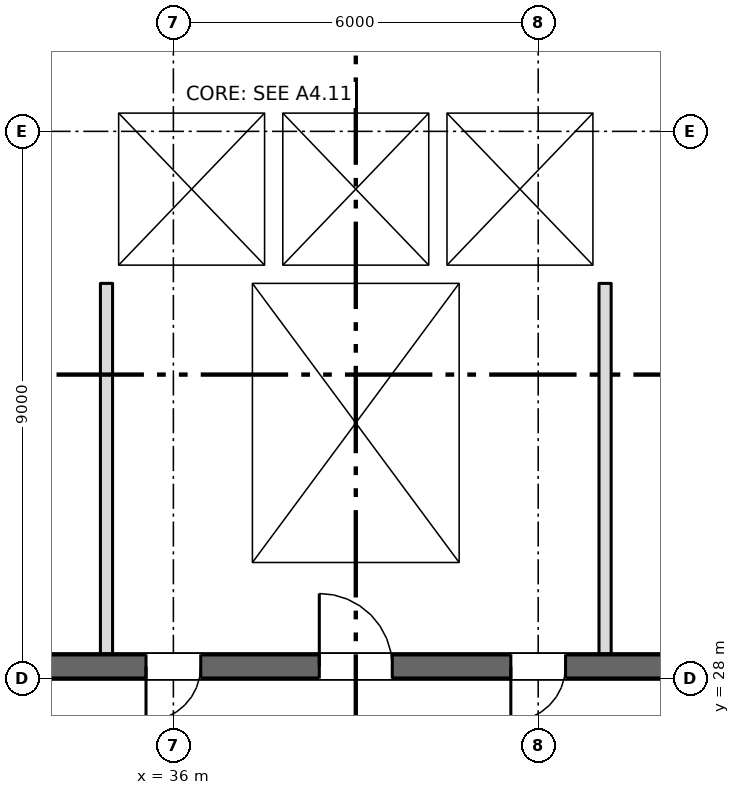
"""IFC4 building model, lengths in metres.
Left out: names, types, materials, properties, quantities, classifications, styles, units other than length and angle.
Written with IfcOpenShell. Run it as: python <this file> out.ifc"""

import sys

from ifc_helpers import new_model, si_unit, direction, frame, frame_2d, origin, place, context, subcontext, project, spatial, rectangle, extrude, element, fill, save


model = new_model("IFC4")
c1 = context("Model", 3, precision=1e-05, world=origin(), true_north=direction((0.0, 1.0)))
c2 = subcontext(c1, "Body", "Model", "MODEL_VIEW")
j1 = project(units=[si_unit("LENGTHUNIT", "METRE"), si_unit("PLANEANGLEUNIT", "RADIAN")], contexts=[c1])
p1 = place(None, origin())
s1 = spatial("IfcSite", under=j1, at=p1, CompositionType="ELEMENT")
p2 = place(p1, origin())
s2 = spatial("IfcBuilding", under=s1, at=p2, CompositionType="ELEMENT")
p3 = place(p2, frame((0.0, 0.0, 71.25)))
s3 = spatial("IfcBuildingStorey", under=s2, at=p3, CompositionType="ELEMENT", Elevation=71.25)
p4 = place(p3, frame((6.7, 28.2, 0.0), z_axis=(0.0, 0.0, 1.0), x_axis=(1.0, 0.0, 0.0)))
e1 = element("IfcWall", 1, at=p4, inside=s3, PredefinedType="SHEAR", context=c2, shape_type="SweptSolid", body=[
    extrude(rectangle(XDim=57.8, YDim=0.4, at=frame_2d((28.9, 0.0))), origin(), (0.0, 0.0, 1.0), 3.35),
])
p5 = place(p4, frame((12.562, 0.0, 0.0)))
e2 = element("IfcOpeningElement", 2, at=p5, cuts=e1, PredefinedType="OPENING", context=c2, shape_type="SweptSolid", body=[
    extrude(rectangle(XDim=0.9, YDim=2.1, at=frame_2d((0.45, 1.05))), frame((0.0, 0.21, 0.0), z_axis=(0.0, -1.0, 0.0), x_axis=(1.0, 0.0, 0.0)), (0.0, 0.0, 1.0), 0.42),
])
p6 = place(p4, frame((15.137, 0.0, 0.0)))
e3 = element("IfcOpeningElement", 3, at=p6, cuts=e1, PredefinedType="OPENING", context=c2, shape_type="SweptSolid", body=[
    extrude(rectangle(XDim=0.9, YDim=2.1, at=frame_2d((0.45, 1.05))), frame((0.0, 0.21, 0.0), z_axis=(0.0, -1.0, 0.0), x_axis=(1.0, 0.0, 0.0)), (0.0, 0.0, 1.0), 0.42),
])
p7 = place(p4, frame((49.85, 0.0, 0.0)))
e4 = element("IfcOpeningElement", 4, at=p7, cuts=e1, PredefinedType="OPENING", context=c2, shape_type="SweptSolid", body=[
    extrude(rectangle(XDim=0.9, YDim=2.1, at=frame_2d((0.45, 1.05))), frame((0.0, 0.21, 0.0), z_axis=(0.0, -1.0, 0.0), x_axis=(1.0, 0.0, 0.0)), (0.0, 0.0, 1.0), 0.42),
])
p8 = place(p4, frame((0.562, 0.0, 0.0)))
e5 = element("IfcOpeningElement", 5, at=p8, cuts=e1, PredefinedType="OPENING", context=c2, shape_type="SweptSolid", body=[
    extrude(rectangle(XDim=0.9, YDim=2.1, at=frame_2d((0.45, 1.05))), frame((0.0, 0.21, 0.0), z_axis=(0.0, -1.0, 0.0), x_axis=(1.0, 0.0, 0.0)), (0.0, 0.0, 1.0), 0.42),
])
p9 = place(p4, frame((2.137, 0.0, 0.0)))
e6 = element("IfcOpeningElement", 6, at=p9, cuts=e1, PredefinedType="OPENING", context=c2, shape_type="SweptSolid", body=[
    extrude(rectangle(XDim=0.9, YDim=2.1, at=frame_2d((0.45, 1.05))), frame((0.0, 0.21, 0.0), z_axis=(0.0, -1.0, 0.0), x_axis=(1.0, 0.0, 0.0)), (0.0, 0.0, 1.0), 0.42),
])
p10 = place(p4, frame((4.7, 0.0, 0.0)))
e7 = element("IfcOpeningElement", 7, at=p10, cuts=e1, PredefinedType="OPENING", context=c2, shape_type="SweptSolid", body=[
    extrude(rectangle(XDim=1.2, YDim=2.1, at=frame_2d((0.6, 1.05))), frame((0.0, 0.21, 0.0), z_axis=(0.0, -1.0, 0.0), x_axis=(1.0, 0.0, 0.0)), (0.0, 0.0, 1.0), 0.42),
])
p11 = place(p4, frame((31.7, 0.0, 0.0)))
e8 = element("IfcOpeningElement", 8, at=p11, cuts=e1, PredefinedType="OPENING", context=c2, shape_type="SweptSolid", body=[
    extrude(rectangle(XDim=1.2, YDim=2.1, at=frame_2d((0.6, 1.05))), frame((0.0, 0.21, 0.0), z_axis=(0.0, -1.0, 0.0), x_axis=(1.0, 0.0, 0.0)), (0.0, 0.0, 1.0), 0.42),
])
p12 = place(p4, frame((55.2, 0.0, 0.0)))
e9 = element("IfcOpeningElement", 9, at=p12, cuts=e1, PredefinedType="OPENING", context=c2, shape_type="SweptSolid", body=[
    extrude(rectangle(XDim=1.2, YDim=2.1, at=frame_2d((0.6, 1.05))), frame((0.0, 0.21, 0.0), z_axis=(0.0, -1.0, 0.0), x_axis=(1.0, 0.0, 0.0)), (0.0, 0.0, 1.0), 0.42),
])
p13 = place(p4, frame((21.7, 0.0, 0.0)))
e10 = element("IfcOpeningElement", 10, at=p13, cuts=e1, PredefinedType="OPENING", context=c2, shape_type="SweptSolid", body=[
    extrude(rectangle(XDim=1.2, YDim=2.1, at=frame_2d((0.6, 1.05))), frame((0.0, 0.21, 0.0), z_axis=(0.0, -1.0, 0.0), x_axis=(1.0, 0.0, 0.0)), (0.0, 0.0, 1.0), 0.42),
])
p14 = place(p4, frame((41.7, 0.0, 0.0)))
e11 = element("IfcOpeningElement", 11, at=p14, cuts=e1, PredefinedType="OPENING", context=c2, shape_type="SweptSolid", body=[
    extrude(rectangle(XDim=1.2, YDim=2.1, at=frame_2d((0.6, 1.05))), frame((0.0, 0.21, 0.0), z_axis=(0.0, -1.0, 0.0), x_axis=(1.0, 0.0, 0.0)), (0.0, 0.0, 1.0), 0.42),
])
p15 = place(p4, frame((24.85, 0.0, 0.0)))
e12 = element("IfcOpeningElement", 12, at=p15, cuts=e1, PredefinedType="OPENING", context=c2, shape_type="SweptSolid", body=[
    extrude(rectangle(XDim=2.4, YDim=2.1, at=frame_2d((1.2, 1.05))), frame((0.0, 0.21, 0.0), z_axis=(0.0, -1.0, 0.0), x_axis=(1.0, 0.0, 0.0)), (0.0, 0.0, 1.0), 0.42),
])
p16 = place(p4, frame((37.35, 0.0, 0.0)))
e13 = element("IfcOpeningElement", 13, at=p16, cuts=e1, PredefinedType="OPENING", context=c2, shape_type="SweptSolid", body=[
    extrude(rectangle(XDim=2.4, YDim=2.1, at=frame_2d((1.2, 1.05))), frame((0.0, 0.21, 0.0), z_axis=(0.0, -1.0, 0.0), x_axis=(1.0, 0.0, 0.0)), (0.0, 0.0, 1.0), 0.42),
])
p17 = place(p4, frame((7.85, 0.0, 0.0)))
e14 = element("IfcOpeningElement", 14, at=p17, cuts=e1, PredefinedType="OPENING", context=c2, shape_type="SweptSolid", body=[
    extrude(rectangle(XDim=2.4, YDim=2.1, at=frame_2d((1.2, 1.05))), frame((0.0, 0.21, 0.0), z_axis=(0.0, -1.0, 0.0), x_axis=(1.0, 0.0, 0.0)), (0.0, 0.0, 1.0), 0.42),
])
p18 = place(p4, frame((28.85, 0.0, 0.0)))
e15 = element("IfcOpeningElement", 15, at=p18, cuts=e1, PredefinedType="OPENING", context=c2, shape_type="SweptSolid", body=[
    extrude(rectangle(XDim=0.9, YDim=2.1, at=frame_2d((0.45, 1.05))), frame((0.0, 0.21, 0.0), z_axis=(0.0, -1.0, 0.0), x_axis=(1.0, 0.0, 0.0)), (0.0, 0.0, 1.0), 0.42),
])
p19 = place(p4, frame((34.85, 0.0, 0.0)))
e16 = element("IfcOpeningElement", 16, at=p19, cuts=e1, PredefinedType="OPENING", context=c2, shape_type="SweptSolid", body=[
    extrude(rectangle(XDim=0.9, YDim=2.1, at=frame_2d((0.45, 1.05))), frame((0.0, 0.21, 0.0), z_axis=(0.0, -1.0, 0.0), x_axis=(1.0, 0.0, 0.0)), (0.0, 0.0, 1.0), 0.42),
])
for number, where, z_axis, x_axis in (
    (17, (37.15, 28.4, 0.0), (0.0, 0.0, 1.0), (0.0, 1.0, 0.0)),
    (18, (40.85, 28.4, 0.0), (0.0, 0.0, 1.0), (0.0, 1.0, 0.0)),
):
    element("IfcWall", number, at=place(p3, frame(where, z_axis=z_axis, x_axis=x_axis)), inside=s3, PredefinedType="SHEAR", context=c2, shape_type="SweptSolid", body=[
        extrude(rectangle(XDim=6.1, YDim=0.3, at=frame_2d((3.05, 0.0))), origin(), (0.0, 0.0, 1.0), 3.35),
    ])
p20 = place(p3, frame((34.8, 34.65, 0.0), z_axis=(0.0, 0.0, 1.0), x_axis=(1.0, 0.0, 0.0)))
e19 = element("IfcWall", 19, at=p20, inside=s3, PredefinedType="SHEAR", context=c2, shape_type="SweptSolid", body=[
    extrude(rectangle(XDim=8.4, YDim=0.3, at=frame_2d((4.2, 0.0))), origin(), (0.0, 0.0, 1.0), 3.35),
])
p21 = place(p3, frame((34.8, 37.45, 0.0), z_axis=(0.0, 0.0, 1.0), x_axis=(1.0, 0.0, 0.0)))
e20 = element("IfcWall", 20, at=p21, inside=s3, PredefinedType="SHEAR", context=c2, shape_type="SweptSolid", body=[
    extrude(rectangle(XDim=8.4, YDim=0.3, at=frame_2d((4.2, 0.0))), origin(), (0.0, 0.0, 1.0), 3.35),
])
p22 = place(p21, frame((0.95, 0.0, 0.0)))
e21 = element("IfcOpeningElement", 21, at=p22, cuts=e20, PredefinedType="OPENING", context=c2, shape_type="SweptSolid", body=[
    extrude(rectangle(XDim=1.1, YDim=2.1, at=frame_2d((0.55, 1.05))), frame((0.0, 0.16, 0.0), z_axis=(0.0, -1.0, 0.0), x_axis=(1.0, 0.0, 0.0)), (0.0, 0.0, 1.0), 0.32),
])
p23 = place(p21, frame((3.65, 0.0, 0.0)))
e22 = element("IfcOpeningElement", 22, at=p23, cuts=e20, PredefinedType="OPENING", context=c2, shape_type="SweptSolid", body=[
    extrude(rectangle(XDim=1.1, YDim=2.1, at=frame_2d((0.55, 1.05))), frame((0.0, 0.16, 0.0), z_axis=(0.0, -1.0, 0.0), x_axis=(1.0, 0.0, 0.0)), (0.0, 0.0, 1.0), 0.32),
])
p24 = place(p21, frame((6.35, 0.0, 0.0)))
e23 = element("IfcOpeningElement", 23, at=p24, cuts=e20, PredefinedType="OPENING", context=c2, shape_type="SweptSolid", body=[
    extrude(rectangle(XDim=1.1, YDim=2.1, at=frame_2d((0.55, 1.05))), frame((0.0, 0.16, 0.0), z_axis=(0.0, -1.0, 0.0), x_axis=(1.0, 0.0, 0.0)), (0.0, 0.0, 1.0), 0.32),
])
for number, where, z_axis, x_axis in (
    (24, (34.95, 34.8, 0.0), (0.0, 0.0, 1.0), (0.0, 1.0, 0.0)),
    (25, (43.05, 34.8, 0.0), (0.0, 0.0, 1.0), (0.0, 1.0, 0.0)),
    (26, (37.65, 34.8, 0.0), (0.0, 0.0, 1.0), (0.0, 1.0, 0.0)),
    (27, (40.35, 34.8, 0.0), (0.0, 0.0, 1.0), (0.0, 1.0, 0.0)),
):
    element("IfcWall", number, at=place(p3, frame(where, z_axis=z_axis, x_axis=x_axis)), inside=s3, PredefinedType="SHEAR", context=c2, shape_type="SweptSolid", body=[
        extrude(rectangle(XDim=2.5, YDim=0.3, at=frame_2d((1.25, 0.0))), origin(), (0.0, 0.0, 1.0), 3.35),
    ])
for number, where, z_axis, x_axis in (
    (28, (34.9, 28.4, 0.0), (0.0, 0.0, 1.0), (0.0, 1.0, 0.0)),
    (29, (43.1, 28.4, 0.0), (0.0, 0.0, 1.0), (0.0, 1.0, 0.0)),
):
    element("IfcWall", number, at=place(p3, frame(where, z_axis=z_axis, x_axis=x_axis)), inside=s3, PredefinedType="PARTITIONING", context=c2, shape_type="SweptSolid", body=[
        extrude(rectangle(XDim=6.1, YDim=0.2, at=frame_2d((3.05, 0.0))), origin(), (0.0, 0.0, 1.0), 3.35),
    ])
p25 = place(p22, origin())
e30 = element("IfcDoor", 30, at=p25, inside=s3, OperationType="SLIDING_TO_LEFT", PredefinedType="DOOR", context=c2, shape_type="SweptSolid", body=[
    extrude(rectangle(XDim=1.1, YDim=2.1, at=frame_2d((0.55, 1.05))), frame((0.0, 0.025, 0.0), z_axis=(0.0, -1.0, 0.0), x_axis=(1.0, 0.0, 0.0)), (0.0, 0.0, 1.0), 0.05),
])
fill(e21, e30)
p26 = place(p23, origin())
e31 = element("IfcDoor", 31, at=p26, inside=s3, OperationType="SLIDING_TO_LEFT", PredefinedType="DOOR", context=c2, shape_type="SweptSolid", body=[
    extrude(rectangle(XDim=1.1, YDim=2.1, at=frame_2d((0.55, 1.05))), frame((0.0, 0.025, 0.0), z_axis=(0.0, -1.0, 0.0), x_axis=(1.0, 0.0, 0.0)), (0.0, 0.0, 1.0), 0.05),
])
fill(e22, e31)
p27 = place(p24, origin())
e32 = element("IfcDoor", 32, at=p27, inside=s3, OperationType="SLIDING_TO_LEFT", PredefinedType="DOOR", context=c2, shape_type="SweptSolid", body=[
    extrude(rectangle(XDim=1.1, YDim=2.1, at=frame_2d((0.55, 1.05))), frame((0.0, 0.025, 0.0), z_axis=(0.0, -1.0, 0.0), x_axis=(1.0, 0.0, 0.0)), (0.0, 0.0, 1.0), 0.05),
])
fill(e23, e32)
p28 = place(p11, origin())
e33 = element("IfcDoor", 33, at=p28, inside=s3, OperationType="SINGLE_SWING_LEFT", PredefinedType="DOOR", context=c2, shape_type="SweptSolid", body=[
    extrude(rectangle(XDim=1.2, YDim=2.1, at=frame_2d((0.6, 1.05))), frame((0.0, 0.025, 0.0), z_axis=(0.0, -1.0, 0.0), x_axis=(1.0, 0.0, 0.0)), (0.0, 0.0, 1.0), 0.05),
])
fill(e8, e33)
p29 = place(p18, origin())
e34 = element("IfcDoor", 34, at=p29, inside=s3, OperationType="SINGLE_SWING_LEFT", PredefinedType="DOOR", context=c2, shape_type="SweptSolid", body=[
    extrude(rectangle(XDim=0.9, YDim=2.1, at=frame_2d((0.45, 1.05))), frame((0.0, 0.025, 0.0), z_axis=(0.0, -1.0, 0.0), x_axis=(1.0, 0.0, 0.0)), (0.0, 0.0, 1.0), 0.05),
])
fill(e15, e34)
p30 = place(p19, origin())
e35 = element("IfcDoor", 35, at=p30, inside=s3, OperationType="SINGLE_SWING_LEFT", PredefinedType="DOOR", context=c2, shape_type="SweptSolid", body=[
    extrude(rectangle(XDim=0.9, YDim=2.1, at=frame_2d((0.45, 1.05))), frame((0.0, 0.025, 0.0), z_axis=(0.0, -1.0, 0.0), x_axis=(1.0, 0.0, 0.0)), (0.0, 0.0, 1.0), 0.05),
])
fill(e16, e35)
save(model, sys.argv[1])
